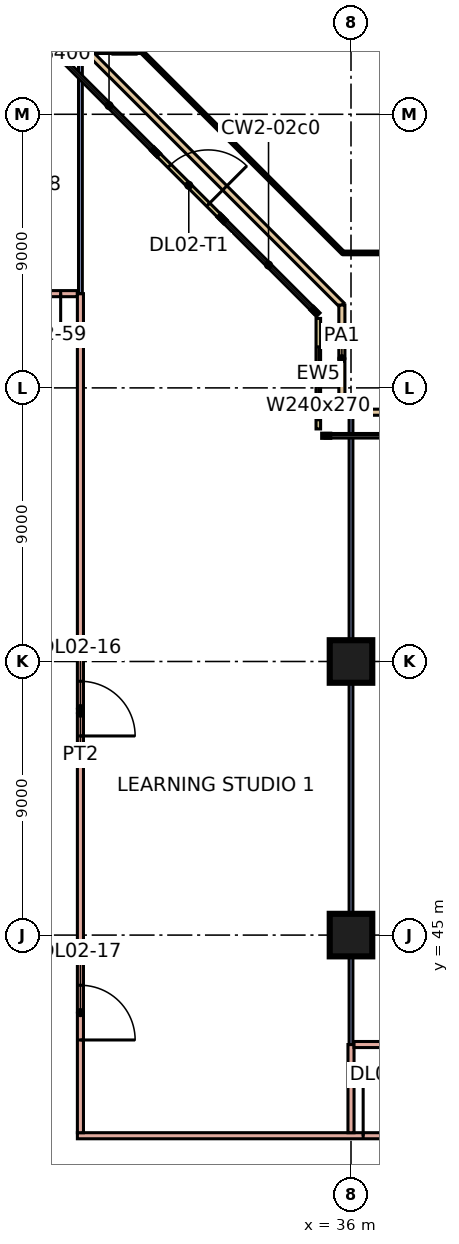
"""IFC4 building model, lengths in metres.
Left out: names, types, materials, properties, quantities, classifications, styles, units other than length and angle.
Written with IfcOpenShell. Run it as: python <this file> out.ifc"""

import sys

from ifc_helpers import new_model, si_unit, direction, frame, frame_2d, origin, origin_2d, place, context, subcontext, project, spatial, rectangle, extrude, element, fill, save


model = new_model("IFC4")
c1 = context("Model", 3, precision=1e-05, world=origin(), true_north=direction((0.0, 1.0)))
c2 = subcontext(c1, "Body", "Model", "MODEL_VIEW")
j1 = project(units=[si_unit("LENGTHUNIT", "METRE"), si_unit("PLANEANGLEUNIT", "RADIAN")], contexts=[c1])
p1 = place(None, origin())
s1 = spatial("IfcSite", under=j1, at=p1, CompositionType="ELEMENT")
p2 = place(p1, origin())
s2 = spatial("IfcBuilding", under=s1, at=p2, CompositionType="ELEMENT")
p3 = place(p2, frame((0.0, 0.0, 12.0)))
s3 = spatial("IfcBuildingStorey", under=s2, at=p3, CompositionType="ELEMENT", Elevation=12.0)
for number, where, z_axis, x_axis in (
    (1, (36.0, 45.0, 0.0), (0.0, 0.0, 1.0), (1.0, 0.0, 0.0)),
    (2, (36.0, 54.0, 0.0), (0.0, 0.0, 1.0), (1.0, 0.0, 0.0)),
):
    element("IfcColumn", number, at=place(p3, frame(where, z_axis=z_axis, x_axis=x_axis)), inside=s3, PredefinedType="COLUMN", context=c2, shape_type="SweptSolid", body=[
        extrude(rectangle(XDim=1.4, YDim=1.4, at=origin_2d()), origin(), (0.0, 0.0, 1.0), 4.8),
    ])
p4 = place(p3, frame((34.925, 61.65, 0.0), z_axis=(0.0, 0.0, 1.0), x_axis=(0.0, 1.0, 0.0)))
e3 = element("IfcWall", 3, at=p4, inside=s3, PredefinedType="SOLIDWALL", context=c2, shape_type="SweptSolid", body=[
    extrude(rectangle(XDim=3.635, YDim=0.15, at=frame_2d((1.817, 0.0))), origin(), (0.0, 0.0, 1.0), 4.4),
])
p5 = place(p4, frame((0.3, 0.0, 0.9)))
e4 = element("IfcOpeningElement", 4, at=p5, cuts=e3, PredefinedType="OPENING", context=c2, shape_type="SweptSolid", body=[
    extrude(rectangle(XDim=2.4, YDim=2.7, at=frame_2d((1.2, 1.35))), frame((0.0, 0.085, 0.0), z_axis=(0.0, -1.0, 0.0), x_axis=(1.0, 0.0, 0.0)), (0.0, 0.0, 1.0), 0.17),
])
p6 = place(p3, frame((31.725, 68.604, 0.0), z_axis=(0.0, 0.0, 1.0), x_axis=(-0.707106781187, 0.707106781187, 0.0)))
e5 = element("IfcWall", 5, at=p6, inside=s3, PredefinedType="SOLIDWALL", context=c2, shape_type="SweptSolid", body=[
    extrude(rectangle(XDim=3.0, YDim=0.15, at=frame_2d((1.5, 0.0))), origin(), (0.0, 0.0, 1.0), 4.4),
])
p7 = place(p6, frame((0.6, 0.0, 0.0)))
e6 = element("IfcOpeningElement", 6, at=p7, cuts=e5, PredefinedType="OPENING", context=c2, shape_type="SweptSolid", body=[
    extrude(rectangle(XDim=1.8, YDim=2.4, at=frame_2d((0.9, 1.2))), frame((0.0, 0.085, 0.0), z_axis=(0.0, -1.0, 0.0), x_axis=(1.0, 0.0, 0.0)), (0.0, 0.0, 1.0), 0.17),
])
p8 = place(p3, frame((35.7, 62.2, 0.0), z_axis=(0.0, 0.0, 1.0), x_axis=(1.0, 0.0, 0.0)))
e7 = element("IfcWall", 7, at=p8, inside=s3, PredefinedType="PARAPET", context=c2, shape_type="SweptSolid", body=[
    extrude(rectangle(XDim=26.5, YDim=0.2, at=frame_2d((13.25, 0.0))), origin(), (0.0, 0.0, 1.0), 0.5),
])
p9 = place(p3, frame((26.725, 74.7, 0.0), z_axis=(0.0, 0.0, 1.0), x_axis=(0.707106781187, -0.707106781187, 0.0)))
e8 = element("IfcWall", 8, at=p9, inside=s3, PredefinedType="PARAPET", context=c2, shape_type="SweptSolid", body=[
    extrude(rectangle(XDim=12.692, YDim=0.2, at=frame_2d((6.346, 0.0))), origin(), (0.0, 0.0, 1.0), 0.5),
])
p10 = place(p3, frame((35.7, 65.725, 0.0), z_axis=(0.0, 0.0, 1.0), x_axis=(0.0, -1.0, 0.0)))
e9 = element("IfcWall", 9, at=p10, inside=s3, PredefinedType="PARAPET", context=c2, shape_type="SweptSolid", body=[
    extrude(rectangle(XDim=3.525, YDim=0.2, at=frame_2d((1.763, 0.0))), origin(), (0.0, 0.0, 1.0), 0.5),
])
p11 = place(p3, frame((-3.0, 66.1, 0.0), z_axis=(0.0, 0.0, 1.0), x_axis=(1.0, 0.0, 0.0)))
e10 = element("IfcWall", 10, at=p11, inside=s3, PredefinedType="PARTITIONING", context=c2, shape_type="SweptSolid", body=[
    extrude(rectangle(XDim=30.0, YDim=0.2, at=frame_2d((15.0, 0.0))), origin(), (0.0, 0.0, 1.0), 4.4),
])
p12 = place(p11, frame((0.65, 0.0, 0.0)))
e11 = element("IfcOpeningElement", 11, at=p12, cuts=e10, PredefinedType="OPENING", context=c2, shape_type="SweptSolid", body=[
    extrude(rectangle(XDim=1.0, YDim=2.1, at=frame_2d((0.5, 1.05))), frame((0.0, 0.11, 0.0), z_axis=(0.0, -1.0, 0.0), x_axis=(1.0, 0.0, 0.0)), (0.0, 0.0, 1.0), 0.22),
])
p13 = place(p11, frame((8.6, 0.0, 0.0)))
e12 = element("IfcOpeningElement", 12, at=p13, cuts=e10, PredefinedType="OPENING", context=c2, shape_type="SweptSolid", body=[
    extrude(rectangle(XDim=1.0, YDim=2.1, at=frame_2d((0.5, 1.05))), frame((0.0, 0.11, 0.0), z_axis=(0.0, -1.0, 0.0), x_axis=(1.0, 0.0, 0.0)), (0.0, 0.0, 1.0), 0.22),
])
p14 = place(p11, frame((13.85, 0.0, 0.0)))
e13 = element("IfcOpeningElement", 13, at=p14, cuts=e10, PredefinedType="OPENING", context=c2, shape_type="SweptSolid", body=[
    extrude(rectangle(XDim=1.0, YDim=2.1, at=frame_2d((0.5, 1.05))), frame((0.0, 0.11, 0.0), z_axis=(0.0, -1.0, 0.0), x_axis=(1.0, 0.0, 0.0)), (0.0, 0.0, 1.0), 0.22),
])
p15 = place(p11, frame((22.35, 0.0, 0.0)))
e14 = element("IfcOpeningElement", 14, at=p15, cuts=e10, PredefinedType="OPENING", context=c2, shape_type="SweptSolid", body=[
    extrude(rectangle(XDim=1.0, YDim=2.1, at=frame_2d((0.5, 1.05))), frame((0.0, 0.11, 0.0), z_axis=(0.0, -1.0, 0.0), x_axis=(1.0, 0.0, 0.0)), (0.0, 0.0, 1.0), 0.22),
])
p16 = place(p11, frame((25.85, 0.0, 0.0)))
e15 = element("IfcOpeningElement", 15, at=p16, cuts=e10, PredefinedType="OPENING", context=c2, shape_type="SweptSolid", body=[
    extrude(rectangle(XDim=1.0, YDim=2.1, at=frame_2d((0.5, 1.05))), frame((0.0, 0.11, 0.0), z_axis=(0.0, -1.0, 0.0), x_axis=(1.0, 0.0, 0.0)), (0.0, 0.0, 1.0), 0.22),
])
p17 = place(p11, frame((28.45, 0.0, 0.0)))
e16 = element("IfcOpeningElement", 16, at=p17, cuts=e10, PredefinedType="OPENING", context=c2, shape_type="SweptSolid", body=[
    extrude(rectangle(XDim=1.0, YDim=2.1, at=frame_2d((0.5, 1.05))), frame((0.0, 0.11, 0.0), z_axis=(0.0, -1.0, 0.0), x_axis=(1.0, 0.0, 0.0)), (0.0, 0.0, 1.0), 0.22),
])
p18 = place(p3, frame((27.0, 38.4, 0.0), z_axis=(0.0, 0.0, 1.0), x_axis=(1.0, 0.0, 0.0)))
e17 = element("IfcWall", 17, at=p18, inside=s3, PredefinedType="PARTITIONING", context=c2, shape_type="SweptSolid", body=[
    extrude(rectangle(XDim=35.1, YDim=0.2, at=frame_2d((17.55, 0.0))), origin(), (0.0, 0.0, 1.0), 4.4),
])
p19 = place(p18, frame((21.9, 0.0, 0.0)))
e18 = element("IfcOpeningElement", 18, at=p19, cuts=e17, PredefinedType="OPENING", context=c2, shape_type="SweptSolid", body=[
    extrude(rectangle(XDim=1.0, YDim=2.1, at=frame_2d((0.5, 1.05))), frame((0.0, 0.11, 0.0), z_axis=(0.0, -1.0, 0.0), x_axis=(1.0, 0.0, 0.0)), (0.0, 0.0, 1.0), 0.22),
])
p20 = place(p18, frame((30.15, 0.0, 0.0)))
e19 = element("IfcOpeningElement", 19, at=p20, cuts=e17, PredefinedType="OPENING", context=c2, shape_type="SweptSolid", body=[
    extrude(rectangle(XDim=1.0, YDim=2.1, at=frame_2d((0.5, 1.05))), frame((0.0, 0.11, 0.0), z_axis=(0.0, -1.0, 0.0), x_axis=(1.0, 0.0, 0.0)), (0.0, 0.0, 1.0), 0.22),
])
p21 = place(p18, frame((9.4, 0.0, 0.0)))
e20 = element("IfcOpeningElement", 20, at=p21, cuts=e17, PredefinedType="OPENING", context=c2, shape_type="SweptSolid", body=[
    extrude(rectangle(XDim=1.8, YDim=2.1, at=frame_2d((0.9, 1.05))), frame((0.0, 0.11, 0.0), z_axis=(0.0, -1.0, 0.0), x_axis=(1.0, 0.0, 0.0)), (0.0, 0.0, 1.0), 0.22),
])
p22 = place(p3, frame((27.1, 38.5, 0.0), z_axis=(0.0, 0.0, 1.0), x_axis=(0.0, 1.0, 0.0)))
e21 = element("IfcWall", 21, at=p22, inside=s3, PredefinedType="PARTITIONING", context=c2, shape_type="SweptSolid", body=[
    extrude(rectangle(XDim=27.6, YDim=0.2, at=frame_2d((13.8, 0.0))), origin(), (0.0, 0.0, 1.0), 4.4),
])
p23 = place(p22, frame((13.05, 0.0, 0.0)))
e22 = element("IfcOpeningElement", 22, at=p23, cuts=e21, PredefinedType="OPENING", context=c2, shape_type="SweptSolid", body=[
    extrude(rectangle(XDim=1.8, YDim=2.1, at=frame_2d((0.9, 1.05))), frame((0.0, 0.11, 0.0), z_axis=(0.0, -1.0, 0.0), x_axis=(1.0, 0.0, 0.0)), (0.0, 0.0, 1.0), 0.22),
])
p24 = place(p22, frame((3.05, 0.0, 0.0)))
e23 = element("IfcOpeningElement", 23, at=p24, cuts=e21, PredefinedType="OPENING", context=c2, shape_type="SweptSolid", body=[
    extrude(rectangle(XDim=1.8, YDim=2.1, at=frame_2d((0.9, 1.05))), frame((0.0, 0.11, 0.0), z_axis=(0.0, -1.0, 0.0), x_axis=(1.0, 0.0, 0.0)), (0.0, 0.0, 1.0), 0.22),
])
p25 = place(p3, frame((27.1, 66.1, 0.0), z_axis=(0.0, 0.0, 1.0), x_axis=(0.0, 1.0, 0.0)))
e24 = element("IfcWall", 24, at=p25, inside=s3, PredefinedType="PARTITIONING", context=c2, shape_type="SweptSolid", body=[
    extrude(rectangle(XDim=8.083, YDim=0.125, at=frame_2d((4.042, 0.0))), origin(), (0.0, 0.0, 1.0), 4.4),
])
p26 = place(p3, frame((36.0, 38.5, 0.0), z_axis=(0.0, 0.0, 1.0), x_axis=(0.0, 1.0, 0.0)))
e25 = element("IfcWall", 25, at=p26, inside=s3, PredefinedType="PARTITIONING", context=c2, shape_type="SweptSolid", body=[
    extrude(rectangle(XDim=2.9, YDim=0.2, at=frame_2d((1.45, 0.0))), origin(), (0.0, 0.0, 1.0), 4.4),
])
p27 = place(p3, frame((36.0, 41.4, 0.0), z_axis=(0.0, 0.0, 1.0), x_axis=(0.0, 1.0, 0.0)))
e26 = element("IfcWall", 26, at=p27, inside=s3, PredefinedType="PARTITIONING", context=c2, shape_type="SweptSolid", body=[
    extrude(rectangle(XDim=20.7, YDim=0.125, at=frame_2d((10.35, 0.0))), origin(), (0.0, 0.0, 1.0), 4.4),
])
p28 = place(p3, frame((36.1, 41.4, 0.0), z_axis=(0.0, 0.0, 1.0), x_axis=(1.0, 0.0, 0.0)))
e27 = element("IfcWall", 27, at=p28, inside=s3, PredefinedType="PARTITIONING", context=c2, shape_type="SweptSolid", body=[
    extrude(rectangle(XDim=26.0, YDim=0.2, at=frame_2d((13.0, 0.0))), origin(), (0.0, 0.0, 1.0), 4.4),
])
p29 = place(p28, frame((3.45, 0.0, 0.0)))
e28 = element("IfcOpeningElement", 28, at=p29, cuts=e27, PredefinedType="OPENING", context=c2, shape_type="SweptSolid", body=[
    extrude(rectangle(XDim=1.8, YDim=2.1, at=frame_2d((0.9, 1.05))), frame((0.0, 0.11, 0.0), z_axis=(0.0, -1.0, 0.0), x_axis=(1.0, 0.0, 0.0)), (0.0, 0.0, 1.0), 0.22),
])
p30 = place(p28, frame((6.95, 0.0, 0.0)))
e29 = element("IfcOpeningElement", 29, at=p30, cuts=e27, PredefinedType="OPENING", context=c2, shape_type="SweptSolid", body=[
    extrude(rectangle(XDim=1.8, YDim=2.1, at=frame_2d((0.9, 1.05))), frame((0.0, 0.11, 0.0), z_axis=(0.0, -1.0, 0.0), x_axis=(1.0, 0.0, 0.0)), (0.0, 0.0, 1.0), 0.22),
])
p31 = place(p28, frame((12.45, 0.0, 0.0)))
e30 = element("IfcOpeningElement", 30, at=p31, cuts=e27, PredefinedType="OPENING", context=c2, shape_type="SweptSolid", body=[
    extrude(rectangle(XDim=1.8, YDim=2.1, at=frame_2d((0.9, 1.05))), frame((0.0, 0.11, 0.0), z_axis=(0.0, -1.0, 0.0), x_axis=(1.0, 0.0, 0.0)), (0.0, 0.0, 1.0), 0.22),
])
p32 = place(p28, frame((15.95, 0.0, 0.0)))
e31 = element("IfcOpeningElement", 31, at=p32, cuts=e27, PredefinedType="OPENING", context=c2, shape_type="SweptSolid", body=[
    extrude(rectangle(XDim=1.8, YDim=2.1, at=frame_2d((0.9, 1.05))), frame((0.0, 0.11, 0.0), z_axis=(0.0, -1.0, 0.0), x_axis=(1.0, 0.0, 0.0)), (0.0, 0.0, 1.0), 0.22),
])
p33 = place(p28, frame((21.175, 0.0, 0.0)))
e32 = element("IfcOpeningElement", 32, at=p33, cuts=e27, PredefinedType="OPENING", context=c2, shape_type="SweptSolid", body=[
    extrude(rectangle(XDim=1.0, YDim=2.1, at=frame_2d((0.5, 1.05))), frame((0.0, 0.11, 0.0), z_axis=(0.0, -1.0, 0.0), x_axis=(1.0, 0.0, 0.0)), (0.0, 0.0, 1.0), 0.22),
])
p34 = place(p28, frame((24.175, 0.0, 0.0)))
e33 = element("IfcOpeningElement", 33, at=p34, cuts=e27, PredefinedType="OPENING", context=c2, shape_type="SweptSolid", body=[
    extrude(rectangle(XDim=1.0, YDim=2.1, at=frame_2d((0.5, 1.05))), frame((0.0, 0.11, 0.0), z_axis=(0.0, -1.0, 0.0), x_axis=(1.0, 0.0, 0.0)), (0.0, 0.0, 1.0), 0.22),
])
p35 = place(p5, origin())
e34 = element("IfcWindow", 34, at=p35, inside=s3, PartitioningType="SINGLE_PANEL", PredefinedType="WINDOW", context=c2, shape_type="SweptSolid", body=[
    extrude(rectangle(XDim=2.4, YDim=2.7, at=frame_2d((1.2, 1.35))), frame((0.0, 0.03, 0.0), z_axis=(0.0, -1.0, 0.0), x_axis=(1.0, 0.0, 0.0)), (0.0, 0.0, 1.0), 0.06),
])
fill(e4, e34)
p36 = place(p7, frame((1.8, 0.0, 0.0), z_axis=(0.0, 0.0, 1.0), x_axis=(-1.0, 0.0, 0.0)))
e35 = element("IfcDoor", 35, at=p36, inside=s3, OperationType="DOUBLE_DOOR_SINGLE_SWING", PredefinedType="DOOR", context=c2, shape_type="SweptSolid", body=[
    extrude(rectangle(XDim=1.8, YDim=2.4, at=frame_2d((0.9, 1.2))), frame((0.0, 0.025, 0.0), z_axis=(0.0, -1.0, 0.0), x_axis=(1.0, 0.0, 0.0)), (0.0, 0.0, 1.0), 0.05),
])
fill(e6, e35)
p37 = place(p23, frame((1.8, 0.0, 0.0), z_axis=(0.0, 0.0, 1.0), x_axis=(-1.0, 0.0, 0.0)))
e36 = element("IfcDoor", 36, at=p37, inside=s3, OperationType="DOUBLE_DOOR_SINGLE_SWING", PredefinedType="DOOR", context=c2, shape_type="SweptSolid", body=[
    extrude(rectangle(XDim=1.8, YDim=2.1, at=frame_2d((0.9, 1.05))), frame((0.0, 0.025, 0.0), z_axis=(0.0, -1.0, 0.0), x_axis=(1.0, 0.0, 0.0)), (0.0, 0.0, 1.0), 0.05),
])
fill(e22, e36)
p38 = place(p24, frame((1.8, 0.0, 0.0), z_axis=(0.0, 0.0, 1.0), x_axis=(-1.0, 0.0, 0.0)))
e37 = element("IfcDoor", 37, at=p38, inside=s3, OperationType="DOUBLE_DOOR_SINGLE_SWING", PredefinedType="DOOR", context=c2, shape_type="SweptSolid", body=[
    extrude(rectangle(XDim=1.8, YDim=2.1, at=frame_2d((0.9, 1.05))), frame((0.0, 0.025, 0.0), z_axis=(0.0, -1.0, 0.0), x_axis=(1.0, 0.0, 0.0)), (0.0, 0.0, 1.0), 0.05),
])
fill(e23, e37)
p39 = place(p21, origin())
e38 = element("IfcDoor", 38, at=p39, inside=s3, OperationType="DOUBLE_DOOR_SINGLE_SWING", PredefinedType="DOOR", context=c2, shape_type="SweptSolid", body=[
    extrude(rectangle(XDim=1.8, YDim=2.1, at=frame_2d((0.9, 1.05))), frame((0.0, 0.025, 0.0), z_axis=(0.0, -1.0, 0.0), x_axis=(1.0, 0.0, 0.0)), (0.0, 0.0, 1.0), 0.05),
])
fill(e20, e38)
p40 = place(p17, origin())
e39 = element("IfcDoor", 39, at=p40, inside=s3, OperationType="SINGLE_SWING_RIGHT", PredefinedType="DOOR", context=c2, shape_type="SweptSolid", body=[
    extrude(rectangle(XDim=1.0, YDim=2.1, at=frame_2d((0.5, 1.05))), frame((0.0, 0.025, 0.0), z_axis=(0.0, -1.0, 0.0), x_axis=(1.0, 0.0, 0.0)), (0.0, 0.0, 1.0), 0.05),
])
fill(e16, e39)
save(model, sys.argv[1])
